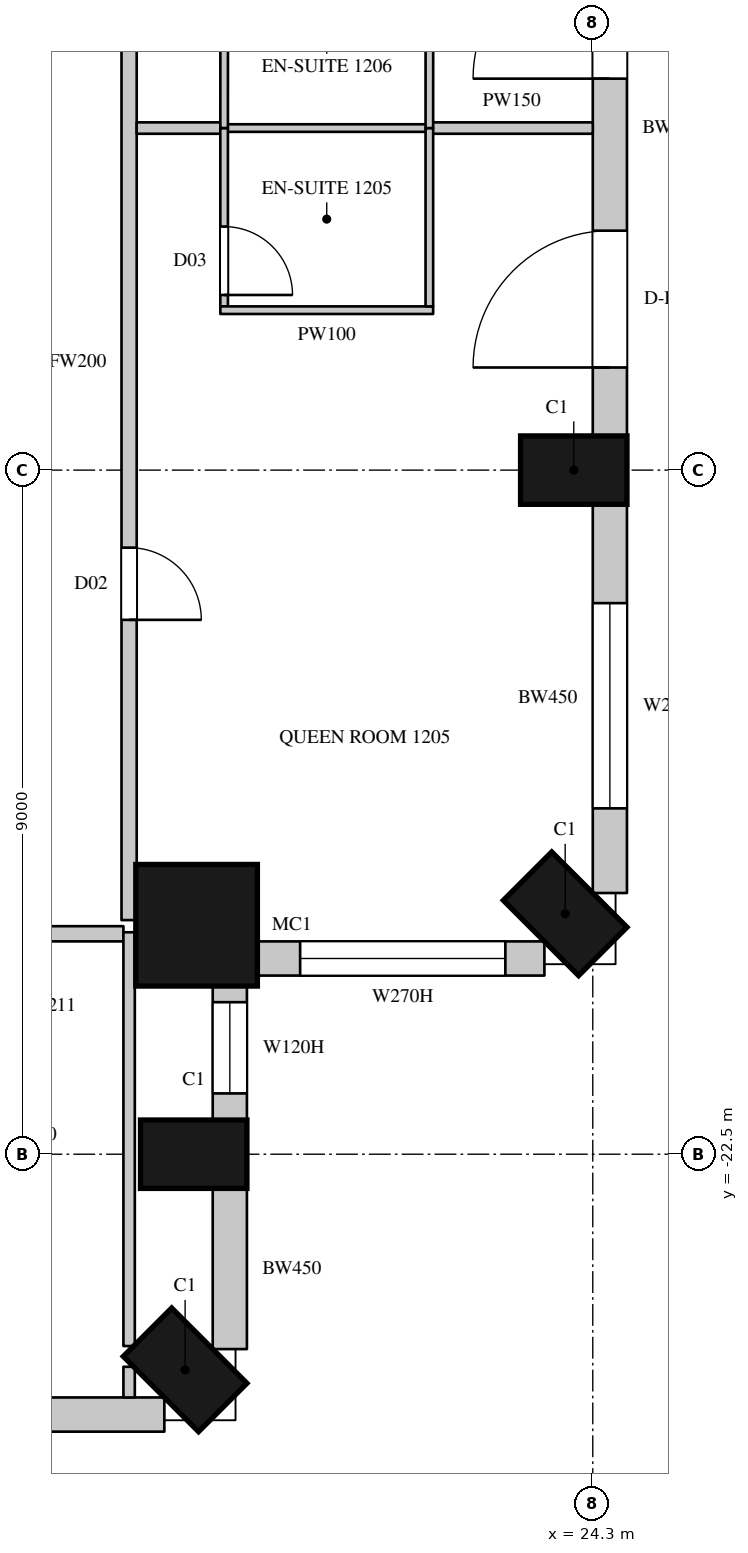
"""IFC4 building model, lengths in metres.
Left out: names, types, materials, properties, quantities, classifications, styles, units other than length and angle.
Written with IfcOpenShell. Run it as: python <this file> out.ifc"""

import sys

from ifc_helpers import new_model, si_unit, direction, frame, frame_2d, origin, origin_2d, place, context, subcontext, project, spatial, rectangle, circle, extrude, element, fill, save


model = new_model("IFC4")
c1 = context("Model", 3, precision=1e-05, world=origin(), true_north=direction((0.0, 1.0)))
c2 = subcontext(c1, "Body", "Model", "MODEL_VIEW")
j1 = project(units=[si_unit("LENGTHUNIT", "METRE"), si_unit("PLANEANGLEUNIT", "RADIAN")], contexts=[c1])
p1 = place(None, origin())
s1 = spatial("IfcSite", under=j1, at=p1, CompositionType="ELEMENT")
p2 = place(p1, origin())
s2 = spatial("IfcBuilding", under=s1, at=p2, CompositionType="ELEMENT")
p3 = place(p2, frame((0.0, 0.0, 73.5)))
s3 = spatial("IfcBuildingStorey", under=s2, at=p3, CompositionType="ELEMENT", Elevation=73.5)
for number, where, z_axis, x_axis in (
    (1, (18.937, -25.337, 0.0), (0.0, 0.0, 1.0), (0.707, 0.707, 0.0)),
    (2, (19.05, -22.5, 0.0), (0.0, 0.0, 1.0), (0.0, 1.0, 0.0)),
):
    element("IfcColumn", number, at=place(p3, frame(where, z_axis=z_axis, x_axis=x_axis)), inside=s3, PredefinedType="COLUMN", context=c2, shape_type="SweptSolid", body=[
        extrude(rectangle(XDim=0.9, YDim=1.4, at=origin_2d()), origin(), (0.0, 0.0, 1.0), 3.6),
    ])
p4 = place(p3, frame((19.088, -19.488, 0.0), z_axis=(0.0, 0.0, 1.0), x_axis=(1.0, 0.0, 0.0)))
e3 = element("IfcColumn", 3, at=p4, inside=s3, PredefinedType="COLUMN", context=c2, shape_type="SweptSolid", body=[
    extrude(circle(Radius=0.8, at=origin_2d()), origin(), (0.0, 0.0, 1.0), 3.6),
])
for number, where, z_axis, x_axis in (
    (4, (23.937, -19.337, 0.0), (0.0, 0.0, 1.0), (0.707, 0.707, 0.0)),
    (5, (24.05, -13.5, 0.0), (0.0, 0.0, 1.0), (0.0, 1.0, 0.0)),
):
    element("IfcColumn", number, at=place(p3, frame(where, z_axis=z_axis, x_axis=x_axis)), inside=s3, PredefinedType="COLUMN", context=c2, shape_type="SweptSolid", body=[
        extrude(rectangle(XDim=0.9, YDim=1.4, at=origin_2d()), origin(), (0.0, 0.0, 1.0), 3.6),
    ])
p5 = place(p3, frame((15.75, -25.925, 0.0), z_axis=(0.0, 0.0, 1.0), x_axis=(1.0, 0.0, 0.0)))
e6 = element("IfcWall", 6, at=p5, inside=s3, PredefinedType="SOLIDWALL", context=c2, shape_type="SweptSolid", body=[
    extrude(rectangle(XDim=2.914, YDim=0.45, at=frame_2d((1.457, 0.0))), origin(), (0.0, 0.0, 1.0), 3.3),
])
p6 = place(p3, frame((19.525, -25.064, 0.0), z_axis=(0.0, 0.0, 1.0), x_axis=(0.0, 1.0, 0.0)))
e7 = element("IfcWall", 7, at=p6, inside=s3, PredefinedType="SOLIDWALL", context=c2, shape_type="SweptSolid", body=[
    extrude(rectangle(XDim=2.114, YDim=0.45, at=frame_2d((1.057, 0.0))), origin(), (0.0, 0.0, 1.0), 3.3),
])
p7 = place(p3, frame((19.525, -22.05, 0.0), z_axis=(0.0, 0.0, 1.0), x_axis=(0.0, 1.0, 0.0)))
e8 = element("IfcWall", 8, at=p7, inside=s3, PredefinedType="SOLIDWALL", context=c2, shape_type="SweptSolid", body=[
    extrude(rectangle(XDim=1.792, YDim=0.45, at=frame_2d((0.896, 0.0))), origin(), (0.0, 0.0, 1.0), 3.3),
])
p8 = place(p7, frame((0.35, 0.0, 1.05)))
e9 = element("IfcOpeningElement", 9, at=p8, cuts=e8, PredefinedType="OPENING", context=c2, shape_type="SweptSolid", body=[
    extrude(rectangle(XDim=1.2, YDim=2.0, at=frame_2d((0.6, 1.0))), frame((0.0, 0.235, 0.0), z_axis=(0.0, -1.0, 0.0), x_axis=(1.0, 0.0, 0.0)), (0.0, 0.0, 1.0), 0.47),
])
p9 = place(p3, frame((19.858, -19.925, 0.0), z_axis=(0.0, 0.0, 1.0), x_axis=(1.0, 0.0, 0.0)))
e10 = element("IfcWall", 10, at=p9, inside=s3, PredefinedType="SOLIDWALL", context=c2, shape_type="SweptSolid", body=[
    extrude(rectangle(XDim=3.805, YDim=0.45, at=frame_2d((1.903, 0.0))), origin(), (0.0, 0.0, 1.0), 3.3),
])
p10 = place(p9, frame((0.592, 0.0, 1.05)))
e11 = element("IfcOpeningElement", 11, at=p10, cuts=e10, PredefinedType="OPENING", context=c2, shape_type="SweptSolid", body=[
    extrude(rectangle(XDim=2.7, YDim=2.0, at=frame_2d((1.35, 1.0))), frame((0.0, 0.235, 0.0), z_axis=(0.0, -1.0, 0.0), x_axis=(1.0, 0.0, 0.0)), (0.0, 0.0, 1.0), 0.47),
])
p11 = place(p3, frame((24.525, -19.064, 0.0), z_axis=(0.0, 0.0, 1.0), x_axis=(0.0, 1.0, 0.0)))
e12 = element("IfcWall", 12, at=p11, inside=s3, PredefinedType="SOLIDWALL", context=c2, shape_type="SweptSolid", body=[
    extrude(rectangle(XDim=5.114, YDim=0.45, at=frame_2d((2.557, 0.0))), origin(), (0.0, 0.0, 1.0), 3.3),
])
p12 = place(p11, frame((1.114, 0.0, 1.05)))
e13 = element("IfcOpeningElement", 13, at=p12, cuts=e12, PredefinedType="OPENING", context=c2, shape_type="SweptSolid", body=[
    extrude(rectangle(XDim=2.7, YDim=2.0, at=frame_2d((1.35, 1.0))), frame((0.0, 0.235, 0.0), z_axis=(0.0, -1.0, 0.0), x_axis=(1.0, 0.0, 0.0)), (0.0, 0.0, 1.0), 0.47),
])
p13 = place(p3, frame((24.525, -13.05, 0.0), z_axis=(0.0, 0.0, 1.0), x_axis=(0.0, 1.0, 0.0)))
e14 = element("IfcWall", 14, at=p13, inside=s3, PredefinedType="SOLIDWALL", context=c2, shape_type="SweptSolid", body=[
    extrude(rectangle(XDim=8.1, YDim=0.45, at=frame_2d((4.05, 0.0))), origin(), (0.0, 0.0, 1.0), 3.3),
])
p14 = place(p13, frame((0.9, 0.0, 0.0)))
e15 = element("IfcOpeningElement", 15, at=p14, cuts=e14, PredefinedType="OPENING", context=c2, shape_type="SweptSolid", body=[
    extrude(rectangle(XDim=1.8, YDim=2.4, at=frame_2d((0.9, 1.2))), frame((0.0, 0.235, 0.0), z_axis=(0.0, -1.0, 0.0), x_axis=(1.0, 0.0, 0.0)), (0.0, 0.0, 1.0), 0.47),
])
p15 = place(p13, frame((4.7, 0.0, 0.0)))
e16 = element("IfcOpeningElement", 16, at=p15, cuts=e14, PredefinedType="OPENING", context=c2, shape_type="SweptSolid", body=[
    extrude(rectangle(XDim=1.8, YDim=2.4, at=frame_2d((0.9, 1.2))), frame((0.0, 0.235, 0.0), z_axis=(0.0, -1.0, 0.0), x_axis=(1.0, 0.0, 0.0)), (0.0, 0.0, 1.0), 0.47),
])
p16 = place(p13, frame((6.7, 0.0, 1.05)))
e17 = element("IfcOpeningElement", 17, at=p16, cuts=e14, PredefinedType="OPENING", context=c2, shape_type="SweptSolid", body=[
    extrude(rectangle(XDim=1.2, YDim=2.0, at=frame_2d((0.6, 1.0))), frame((0.0, 0.235, 0.0), z_axis=(0.0, -1.0, 0.0), x_axis=(1.0, 0.0, 0.0)), (0.0, 0.0, 1.0), 0.47),
])
p17 = place(p3, frame((-20.7, -19.6, 0.0), z_axis=(0.0, 0.0, 1.0), x_axis=(1.0, 0.0, 0.0)))
e18 = element("IfcWall", 18, at=p17, inside=s3, PredefinedType="PARTITIONING", context=c2, shape_type="SweptSolid", body=[
    extrude(rectangle(XDim=38.825, YDim=0.2, at=frame_2d((19.413, 0.0))), origin(), (0.0, 0.0, 1.0), 3.3),
])
p18 = place(p17, frame((3.15, 0.0, 0.0)))
e19 = element("IfcOpeningElement", 19, at=p18, cuts=e18, PredefinedType="OPENING", context=c2, shape_type="SweptSolid", body=[
    extrude(rectangle(XDim=0.95, YDim=2.2, at=frame_2d((0.475, 1.1))), frame((0.0, 0.11, 0.0), z_axis=(0.0, -1.0, 0.0), x_axis=(1.0, 0.0, 0.0)), (0.0, 0.0, 1.0), 0.22),
])
p19 = place(p17, frame((13.9, 0.0, 0.0)))
e20 = element("IfcOpeningElement", 20, at=p19, cuts=e18, PredefinedType="OPENING", context=c2, shape_type="SweptSolid", body=[
    extrude(rectangle(XDim=0.95, YDim=2.2, at=frame_2d((0.475, 1.1))), frame((0.0, 0.11, 0.0), z_axis=(0.0, -1.0, 0.0), x_axis=(1.0, 0.0, 0.0)), (0.0, 0.0, 1.0), 0.22),
])
p20 = place(p17, frame((21.15, 0.0, 0.0)))
e21 = element("IfcOpeningElement", 21, at=p20, cuts=e18, PredefinedType="OPENING", context=c2, shape_type="SweptSolid", body=[
    extrude(rectangle(XDim=0.95, YDim=2.2, at=frame_2d((0.475, 1.1))), frame((0.0, 0.11, 0.0), z_axis=(0.0, -1.0, 0.0), x_axis=(1.0, 0.0, 0.0)), (0.0, 0.0, 1.0), 0.22),
])
p21 = place(p17, frame((29.75, 0.0, 0.0)))
e22 = element("IfcOpeningElement", 22, at=p21, cuts=e18, PredefinedType="OPENING", context=c2, shape_type="SweptSolid", body=[
    extrude(rectangle(XDim=1.1, YDim=2.4, at=frame_2d((0.55, 1.2))), frame((0.0, 0.11, 0.0), z_axis=(0.0, -1.0, 0.0), x_axis=(1.0, 0.0, 0.0)), (0.0, 0.0, 1.0), 0.22),
])
p22 = place(p3, frame((18.2, -19.42, 0.0), z_axis=(0.0, 0.0, 1.0), x_axis=(0.0, 1.0, 0.0)))
e23 = element("IfcWall", 23, at=p22, inside=s3, PredefinedType="PARTITIONING", context=c2, shape_type="SweptSolid", body=[
    extrude(rectangle(XDim=14.67, YDim=0.2, at=frame_2d((7.335, 0.0))), origin(), (0.0, 0.0, 1.0), 3.3),
])
p23 = place(p22, frame((3.95, 0.0, 0.0)))
e24 = element("IfcOpeningElement", 24, at=p23, cuts=e23, PredefinedType="OPENING", context=c2, shape_type="SweptSolid", body=[
    extrude(rectangle(XDim=0.95, YDim=2.2, at=frame_2d((0.475, 1.1))), frame((0.0, 0.11, 0.0), z_axis=(0.0, -1.0, 0.0), x_axis=(1.0, 0.0, 0.0)), (0.0, 0.0, 1.0), 0.22),
])
p24 = place(p22, frame((13.35, 0.0, 0.0)))
e25 = element("IfcOpeningElement", 25, at=p24, cuts=e23, PredefinedType="OPENING", context=c2, shape_type="SweptSolid", body=[
    extrude(rectangle(XDim=0.95, YDim=2.2, at=frame_2d((0.475, 1.1))), frame((0.0, 0.11, 0.0), z_axis=(0.0, -1.0, 0.0), x_axis=(1.0, 0.0, 0.0)), (0.0, 0.0, 1.0), 0.22),
])
p25 = place(p3, frame((18.2, -25.7, 0.0), z_axis=(0.0, 0.0, 1.0), x_axis=(0.0, 1.0, 0.0)))
e26 = element("IfcWall", 26, at=p25, inside=s3, PredefinedType="PARTITIONING", context=c2, shape_type="SweptSolid", body=[
    extrude(rectangle(XDim=0.404, YDim=0.15, at=frame_2d((0.202, 0.0))), origin(), (0.0, 0.0, 1.0), 3.3),
])
p26 = place(p3, frame((18.2, -25.024, 0.0), z_axis=(0.0, 0.0, 1.0), x_axis=(0.0, 1.0, 0.0)))
e27 = element("IfcWall", 27, at=p26, inside=s3, PredefinedType="PARTITIONING", context=c2, shape_type="SweptSolid", body=[
    extrude(rectangle(XDim=5.444, YDim=0.15, at=frame_2d((2.722, 0.0))), origin(), (0.0, 0.0, 1.0), 3.3),
])
p27 = place(p3, frame((18.3, -9.0, 0.0), z_axis=(0.0, 0.0, 1.0), x_axis=(1.0, 0.0, 0.0)))
e28 = element("IfcWall", 28, at=p27, inside=s3, PredefinedType="PARTITIONING", context=c2, shape_type="SweptSolid", body=[
    extrude(rectangle(XDim=1.13, YDim=0.15, at=frame_2d((0.565, 0.0))), origin(), (0.0, 0.0, 1.0), 2.65),
])
p28 = place(p3, frame((22.17, -9.0, 0.0), z_axis=(0.0, 0.0, 1.0), x_axis=(1.0, 0.0, 0.0)))
e29 = element("IfcWall", 29, at=p28, inside=s3, PredefinedType="PARTITIONING", context=c2, shape_type="SweptSolid", body=[
    extrude(rectangle(XDim=2.13, YDim=0.15, at=frame_2d((1.065, 0.0))), origin(), (0.0, 0.0, 1.0), 2.65),
])
p29 = place(p3, frame((19.43, -9.0, 0.0), z_axis=(0.0, 0.0, 1.0), x_axis=(1.0, 0.0, 0.0)))
e30 = element("IfcWall", 30, at=p29, inside=s3, PredefinedType="PARTITIONING", context=c2, shape_type="SweptSolid", body=[
    extrude(rectangle(XDim=2.74, YDim=0.1, at=frame_2d((1.37, 0.0))), origin(), (0.0, 0.0, 1.0), 2.65),
])
p30 = place(p3, frame((19.45, -11.346, 0.0), z_axis=(0.0, 0.0, 1.0), x_axis=(0.0, 1.0, 0.0)))
e31 = element("IfcWall", 31, at=p30, inside=s3, PredefinedType="PARTITIONING", context=c2, shape_type="SweptSolid", body=[
    extrude(rectangle(XDim=2.346, YDim=0.1, at=frame_2d((1.173, 0.0))), origin(), (0.0, 0.0, 1.0), 3.3),
])
p31 = place(p30, frame((0.15, 0.0, 0.0)))
e32 = element("IfcOpeningElement", 32, at=p31, cuts=e31, PredefinedType="OPENING", context=c2, shape_type="SweptSolid", body=[
    extrude(rectangle(XDim=0.9, YDim=2.2, at=frame_2d((0.45, 1.1))), frame((0.0, 0.06, 0.0), z_axis=(0.0, -1.0, 0.0), x_axis=(1.0, 0.0, 0.0)), (0.0, 0.0, 1.0), 0.12),
])
p32 = place(p3, frame((19.4, -11.396, 0.0), z_axis=(0.0, 0.0, 1.0), x_axis=(1.0, 0.0, 0.0)))
e33 = element("IfcWall", 33, at=p32, inside=s3, PredefinedType="PARTITIONING", context=c2, shape_type="SweptSolid", body=[
    extrude(rectangle(XDim=2.8, YDim=0.1, at=frame_2d((1.4, 0.0))), origin(), (0.0, 0.0, 1.0), 3.3),
])
p33 = place(p3, frame((19.45, -9.0, 0.0), z_axis=(0.0, 0.0, 1.0), x_axis=(0.000399241409, 0.999999920303, 0.0)))
e34 = element("IfcWall", 34, at=p33, inside=s3, PredefinedType="PARTITIONING", context=c2, shape_type="SweptSolid", body=[
    extrude(rectangle(XDim=2.446, YDim=0.1, at=frame_2d((1.223, 0.0))), origin(), (0.0, 0.0, 1.0), 3.3),
])
p34 = place(p33, frame((1.3, 0.0, 0.0)))
e35 = element("IfcOpeningElement", 35, at=p34, cuts=e34, PredefinedType="OPENING", context=c2, shape_type="SweptSolid", body=[
    extrude(rectangle(XDim=0.9, YDim=2.2, at=frame_2d((0.45, 1.1))), frame((0.0, 0.06, 0.0), z_axis=(0.0, -1.0, 0.0), x_axis=(1.0, 0.0, 0.0)), (0.0, 0.0, 1.0), 0.12),
])
p35 = place(p3, frame((22.15, -11.346, 0.0), z_axis=(0.0, 0.0, 1.0), x_axis=(0.0, 1.0, 0.0)))
e36 = element("IfcWall", 36, at=p35, inside=s3, PredefinedType="PARTITIONING", context=c2, shape_type="SweptSolid", body=[
    extrude(rectangle(XDim=2.346, YDim=0.1, at=frame_2d((1.173, 0.0))), origin(), (0.0, 0.0, 1.0), 3.3),
])
p36 = place(p3, frame((22.15, -9.0, 0.0), z_axis=(0.0, 0.0, 1.0), x_axis=(0.00041644973, 0.999999913285, 0.0)))
e37 = element("IfcWall", 37, at=p36, inside=s3, PredefinedType="PARTITIONING", context=c2, shape_type="SweptSolid", body=[
    extrude(rectangle(XDim=2.345, YDim=0.1, at=frame_2d((1.172, 0.0))), origin(), (0.0, 0.0, 1.0), 3.3),
])
p37 = place(p8, origin())
e38 = element("IfcWindow", 38, at=p37, inside=s3, PartitioningType="SINGLE_PANEL", PredefinedType="WINDOW", context=c2, shape_type="SweptSolid", body=[
    extrude(rectangle(XDim=1.2, YDim=2.0, at=frame_2d((0.6, 1.0))), frame((0.0, 0.135, 0.0), z_axis=(0.0, -1.0, 0.0), x_axis=(1.0, 0.0, 0.0)), (0.0, 0.0, 1.0), 0.06),
])
fill(e9, e38)
p38 = place(p10, origin())
e39 = element("IfcWindow", 39, at=p38, inside=s3, PartitioningType="SINGLE_PANEL", PredefinedType="WINDOW", context=c2, shape_type="SweptSolid", body=[
    extrude(rectangle(XDim=2.7, YDim=2.0, at=frame_2d((1.35, 1.0))), frame((0.0, 0.135, 0.0), z_axis=(0.0, -1.0, 0.0), x_axis=(1.0, 0.0, 0.0)), (0.0, 0.0, 1.0), 0.06),
])
fill(e11, e39)
p39 = place(p12, origin())
e40 = element("IfcWindow", 40, at=p39, inside=s3, PartitioningType="SINGLE_PANEL", PredefinedType="WINDOW", context=c2, shape_type="SweptSolid", body=[
    extrude(rectangle(XDim=2.7, YDim=2.0, at=frame_2d((1.35, 1.0))), frame((0.0, 0.135, 0.0), z_axis=(0.0, -1.0, 0.0), x_axis=(1.0, 0.0, 0.0)), (0.0, 0.0, 1.0), 0.06),
])
fill(e13, e40)
p40 = place(p14, origin())
e41 = element("IfcDoor", 41, at=p40, inside=s3, OperationType="SLIDING_TO_LEFT", PredefinedType="DOOR", context=c2, shape_type="SweptSolid", body=[
    extrude(rectangle(XDim=1.8, YDim=2.4, at=frame_2d((0.9, 1.2))), frame((0.0, 0.13, 0.0), z_axis=(0.0, -1.0, 0.0), x_axis=(1.0, 0.0, 0.0)), (0.0, 0.0, 1.0), 0.05),
])
fill(e15, e41)
p41 = place(p15, origin())
e42 = element("IfcDoor", 42, at=p41, inside=s3, OperationType="SLIDING_TO_LEFT", PredefinedType="DOOR", context=c2, shape_type="SweptSolid", body=[
    extrude(rectangle(XDim=1.8, YDim=2.4, at=frame_2d((0.9, 1.2))), frame((0.0, 0.13, 0.0), z_axis=(0.0, -1.0, 0.0), x_axis=(1.0, 0.0, 0.0)), (0.0, 0.0, 1.0), 0.05),
])
fill(e16, e42)
p42 = place(p23, origin())
e43 = element("IfcDoor", 43, at=p42, inside=s3, OperationType="SINGLE_SWING_RIGHT", PredefinedType="DOOR", context=c2, shape_type="SweptSolid", body=[
    extrude(rectangle(XDim=0.95, YDim=2.2, at=frame_2d((0.475, 1.1))), frame((0.0, 0.025, 0.0), z_axis=(0.0, -1.0, 0.0), x_axis=(1.0, 0.0, 0.0)), (0.0, 0.0, 1.0), 0.05),
])
fill(e24, e43)
p43 = place(p31, origin())
e44 = element("IfcDoor", 44, at=p43, inside=s3, OperationType="SINGLE_SWING_RIGHT", PredefinedType="DOOR", context=c2, shape_type="SweptSolid", body=[
    extrude(rectangle(XDim=0.9, YDim=2.2, at=frame_2d((0.45, 1.1))), frame((0.0, 0.025, 0.0), z_axis=(0.0, -1.0, 0.0), x_axis=(1.0, 0.0, 0.0)), (0.0, 0.0, 1.0), 0.05),
])
fill(e32, e44)
save(model, sys.argv[1])
